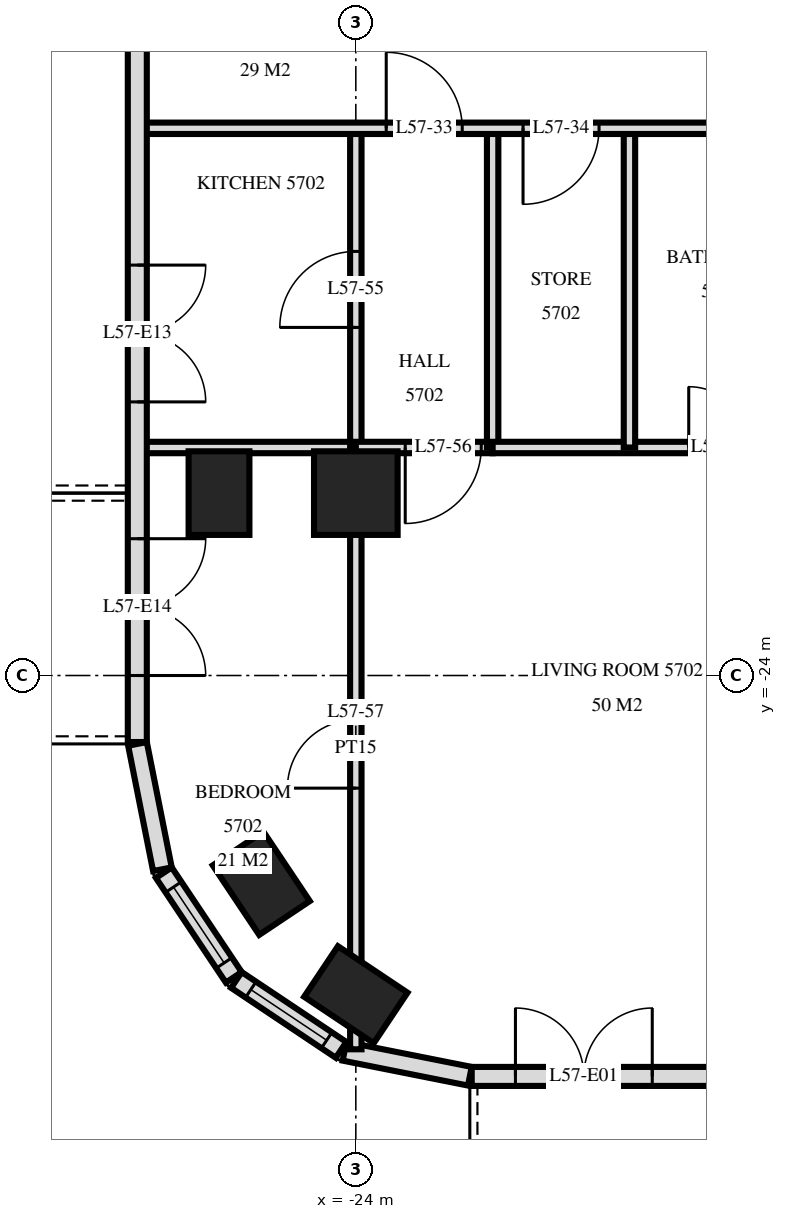
"""IFC4 building model, lengths in metres.
Left out: names, types, materials, properties, quantities, classifications, styles, units other than length and angle.
Written with IfcOpenShell. Run it as: python <this file> out.ifc"""

import sys

from ifc_helpers import new_model, si_unit, direction, frame, frame_2d, origin, origin_2d, place, context, subcontext, project, spatial, rectangle, extrude, element, fill, save


model = new_model("IFC4")
c1 = context("Model", 3, precision=1e-05, world=origin(), true_north=direction((0.0, 1.0)))
c2 = subcontext(c1, "Body", "Model", "MODEL_VIEW")
j1 = project(units=[si_unit("LENGTHUNIT", "METRE"), si_unit("PLANEANGLEUNIT", "RADIAN")], contexts=[c1])
p1 = place(None, origin())
s1 = spatial("IfcSite", under=j1, at=p1, CompositionType="ELEMENT")
p2 = place(p1, origin())
s2 = spatial("IfcBuilding", under=s1, at=p2, CompositionType="ELEMENT")
p3 = place(p2, frame((0.0, 0.0, 218.6)))
s3 = spatial("IfcBuildingStorey", under=s2, at=p3, CompositionType="ELEMENT", Elevation=218.6)
for number, where, z_axis, x_axis in (
    (1, (-25.8, -21.6, 0.0), (0.0, 0.0, 1.0), (0.0, 1.0, 0.0)),
    (2, (-25.244, -26.733, 0.0), (0.0, 0.0, 1.0), (-0.556, 0.831, 0.0)),
    (3, (-24.0, -28.2, 0.0), (0.0, 0.0, 1.0), (-0.831, 0.556, 0.0)),
):
    element("IfcColumn", number, at=place(p3, frame(where, z_axis=z_axis, x_axis=x_axis)), inside=s3, PredefinedType="COLUMN", context=c2, shape_type="SweptSolid", body=[
        extrude(rectangle(XDim=1.1, YDim=0.8, at=origin_2d()), origin(), (0.0, 0.0, 1.0), 3.5),
    ])
p4 = place(p3, frame((-24.0, -21.6, 0.0), z_axis=(0.0, 0.0, 1.0), x_axis=(1.0, 0.0, 0.0)))
e4 = element("IfcColumn", 4, at=p4, inside=s3, PredefinedType="COLUMN", context=c2, shape_type="SweptSolid", body=[
    extrude(rectangle(XDim=1.1, YDim=1.1, at=origin_2d()), origin(), (0.0, 0.0, 1.0), 3.5),
])
p5 = place(p3, frame((-26.875, -3.325, 0.0), z_axis=(0.0, 0.0, 1.0), x_axis=(0.0, -1.0, 0.0)))
e5 = element("IfcWall", 5, at=p5, inside=s3, PredefinedType="SOLIDWALL", context=c2, shape_type="SweptSolid", body=[
    extrude(rectangle(XDim=21.551, YDim=0.25, at=frame_2d((10.775, 0.0))), origin(), (0.0, 0.0, 1.0), 3.22),
])
p6 = place(p5, frame((7.275, 0.0, 0.0)))
e6 = element("IfcOpeningElement", 6, at=p6, cuts=e5, PredefinedType="OPENING", context=c2, shape_type="SweptSolid", body=[
    extrude(rectangle(XDim=1.8, YDim=2.4, at=frame_2d((0.9, 1.2))), frame((0.0, 0.135, 0.0), z_axis=(0.0, -1.0, 0.0), x_axis=(1.0, 0.0, 0.0)), (0.0, 0.0, 1.0), 0.27),
])
p7 = place(p5, frame((15.275, 0.0, 0.0)))
e7 = element("IfcOpeningElement", 7, at=p7, cuts=e5, PredefinedType="OPENING", context=c2, shape_type="SweptSolid", body=[
    extrude(rectangle(XDim=1.8, YDim=2.4, at=frame_2d((0.9, 1.2))), frame((0.0, 0.135, 0.0), z_axis=(0.0, -1.0, 0.0), x_axis=(1.0, 0.0, 0.0)), (0.0, 0.0, 1.0), 0.27),
])
p8 = place(p5, frame((18.875, 0.0, 0.0)))
e8 = element("IfcOpeningElement", 8, at=p8, cuts=e5, PredefinedType="OPENING", context=c2, shape_type="SweptSolid", body=[
    extrude(rectangle(XDim=1.8, YDim=2.4, at=frame_2d((0.9, 1.2))), frame((0.0, 0.135, 0.0), z_axis=(0.0, -1.0, 0.0), x_axis=(1.0, 0.0, 0.0)), (0.0, 0.0, 1.0), 0.27),
])
p9 = place(p3, frame((-26.873, -24.9, 0.0), z_axis=(0.0, 0.0, 1.0), x_axis=(0.195026884138, -0.980797896849, 0.0)))
e9 = element("IfcWall", 9, at=p9, inside=s3, PredefinedType="SOLIDWALL", context=c2, shape_type="SweptSolid", body=[
    extrude(rectangle(XDim=1.681, YDim=0.25, at=frame_2d((0.841, 0.0))), origin(), (0.0, 0.0, 1.0), 3.22),
])
p10 = place(p3, frame((-26.526, -26.594, 0.0), z_axis=(0.0, 0.0, 1.0), x_axis=(0.55555029066, -0.831482937015, 0.0)))
e10 = element("IfcWall", 10, at=p10, inside=s3, PredefinedType="SOLIDWALL", context=c2, shape_type="SweptSolid", body=[
    extrude(rectangle(XDim=1.656, YDim=0.25, at=frame_2d((0.828, 0.0))), origin(), (0.0, 0.0, 1.0), 3.22),
])
p11 = place(p10, frame((0.228, 0.0, 0.9)))
e11 = element("IfcOpeningElement", 11, at=p11, cuts=e10, PredefinedType="OPENING", context=c2, shape_type="SweptSolid", body=[
    extrude(rectangle(XDim=1.2, YDim=1.5, at=frame_2d((0.6, 0.75))), frame((0.0, 0.135, 0.0), z_axis=(0.0, -1.0, 0.0), x_axis=(1.0, 0.0, 0.0)), (0.0, 0.0, 1.0), 0.27),
])
p12 = place(p3, frame((-25.571, -28.006, 0.0), z_axis=(0.0, 0.0, 1.0), x_axis=(0.831482937015, -0.55555029066, 0.0)))
e12 = element("IfcWall", 12, at=p12, inside=s3, PredefinedType="SOLIDWALL", context=c2, shape_type="SweptSolid", body=[
    extrude(rectangle(XDim=1.656, YDim=0.25, at=frame_2d((0.828, 0.0))), origin(), (0.0, 0.0, 1.0), 3.22),
])
p13 = place(p12, frame((0.228, 0.0, 0.9)))
e13 = element("IfcOpeningElement", 13, at=p13, cuts=e12, PredefinedType="OPENING", context=c2, shape_type="SweptSolid", body=[
    extrude(rectangle(XDim=1.2, YDim=1.5, at=frame_2d((0.6, 0.75))), frame((0.0, 0.135, 0.0), z_axis=(0.0, -1.0, 0.0), x_axis=(1.0, 0.0, 0.0)), (0.0, 0.0, 1.0), 0.27),
])
p14 = place(p3, frame((-24.149, -28.945, 0.0), z_axis=(0.0, 0.0, 1.0), x_axis=(0.980775640221, -0.19513878023, 0.0)))
e14 = element("IfcWall", 14, at=p14, inside=s3, PredefinedType="SOLIDWALL", context=c2, shape_type="SweptSolid", body=[
    extrude(rectangle(XDim=1.681, YDim=0.25, at=frame_2d((0.841, 0.0))), origin(), (0.0, 0.0, 1.0), 3.22),
])
p15 = place(p3, frame((-22.475, -29.275, 0.0), z_axis=(0.0, 0.0, 1.0), x_axis=(1.0, 0.0, 0.0)))
e15 = element("IfcWall", 15, at=p15, inside=s3, PredefinedType="SOLIDWALL", context=c2, shape_type="SweptSolid", body=[
    extrude(rectangle(XDim=44.951, YDim=0.25, at=frame_2d((22.475, 0.0))), origin(), (0.0, 0.0, 1.0), 3.22),
])
p16 = place(p15, frame((0.575, 0.0, 0.0)))
e16 = element("IfcOpeningElement", 16, at=p16, cuts=e15, PredefinedType="OPENING", context=c2, shape_type="SweptSolid", body=[
    extrude(rectangle(XDim=1.8, YDim=2.4, at=frame_2d((0.9, 1.2))), frame((0.0, 0.135, 0.0), z_axis=(0.0, -1.0, 0.0), x_axis=(1.0, 0.0, 0.0)), (0.0, 0.0, 1.0), 0.27),
])
p17 = place(p15, frame((4.775, 0.0, 0.9)))
e17 = element("IfcOpeningElement", 17, at=p17, cuts=e15, PredefinedType="OPENING", context=c2, shape_type="SweptSolid", body=[
    extrude(rectangle(XDim=2.4, YDim=1.5, at=frame_2d((1.2, 0.75))), frame((0.0, 0.135, 0.0), z_axis=(0.0, -1.0, 0.0), x_axis=(1.0, 0.0, 0.0)), (0.0, 0.0, 1.0), 0.27),
])
p18 = place(p15, frame((8.075, 0.0, 0.0)))
e18 = element("IfcOpeningElement", 18, at=p18, cuts=e15, PredefinedType="OPENING", context=c2, shape_type="SweptSolid", body=[
    extrude(rectangle(XDim=1.8, YDim=2.4, at=frame_2d((0.9, 1.2))), frame((0.0, 0.135, 0.0), z_axis=(0.0, -1.0, 0.0), x_axis=(1.0, 0.0, 0.0)), (0.0, 0.0, 1.0), 0.27),
])
p19 = place(p15, frame((11.075, 0.0, 0.0)))
e19 = element("IfcOpeningElement", 19, at=p19, cuts=e15, PredefinedType="OPENING", context=c2, shape_type="SweptSolid", body=[
    extrude(rectangle(XDim=1.8, YDim=2.4, at=frame_2d((0.9, 1.2))), frame((0.0, 0.135, 0.0), z_axis=(0.0, -1.0, 0.0), x_axis=(1.0, 0.0, 0.0)), (0.0, 0.0, 1.0), 0.27),
])
p20 = place(p15, frame((13.775, 0.0, 0.9)))
e20 = element("IfcOpeningElement", 20, at=p20, cuts=e15, PredefinedType="OPENING", context=c2, shape_type="SweptSolid", body=[
    extrude(rectangle(XDim=2.4, YDim=1.5, at=frame_2d((1.2, 0.75))), frame((0.0, 0.135, 0.0), z_axis=(0.0, -1.0, 0.0), x_axis=(1.0, 0.0, 0.0)), (0.0, 0.0, 1.0), 0.27),
])
p21 = place(p15, frame((16.775, 0.0, 0.9)))
e21 = element("IfcOpeningElement", 21, at=p21, cuts=e15, PredefinedType="OPENING", context=c2, shape_type="SweptSolid", body=[
    extrude(rectangle(XDim=2.4, YDim=1.5, at=frame_2d((1.2, 0.75))), frame((0.0, 0.135, 0.0), z_axis=(0.0, -1.0, 0.0), x_axis=(1.0, 0.0, 0.0)), (0.0, 0.0, 1.0), 0.27),
])
p22 = place(p15, frame((20.075, 0.0, 0.0)))
e22 = element("IfcOpeningElement", 22, at=p22, cuts=e15, PredefinedType="OPENING", context=c2, shape_type="SweptSolid", body=[
    extrude(rectangle(XDim=1.8, YDim=2.4, at=frame_2d((0.9, 1.2))), frame((0.0, 0.135, 0.0), z_axis=(0.0, -1.0, 0.0), x_axis=(1.0, 0.0, 0.0)), (0.0, 0.0, 1.0), 0.27),
])
p23 = place(p15, frame((23.075, 0.0, 0.0)))
e23 = element("IfcOpeningElement", 23, at=p23, cuts=e15, PredefinedType="OPENING", context=c2, shape_type="SweptSolid", body=[
    extrude(rectangle(XDim=1.8, YDim=2.4, at=frame_2d((0.9, 1.2))), frame((0.0, 0.135, 0.0), z_axis=(0.0, -1.0, 0.0), x_axis=(1.0, 0.0, 0.0)), (0.0, 0.0, 1.0), 0.27),
])
p24 = place(p15, frame((25.775, 0.0, 0.9)))
e24 = element("IfcOpeningElement", 24, at=p24, cuts=e15, PredefinedType="OPENING", context=c2, shape_type="SweptSolid", body=[
    extrude(rectangle(XDim=2.4, YDim=1.5, at=frame_2d((1.2, 0.75))), frame((0.0, 0.135, 0.0), z_axis=(0.0, -1.0, 0.0), x_axis=(1.0, 0.0, 0.0)), (0.0, 0.0, 1.0), 0.27),
])
p25 = place(p15, frame((29.075, 0.0, 0.0)))
e25 = element("IfcOpeningElement", 25, at=p25, cuts=e15, PredefinedType="OPENING", context=c2, shape_type="SweptSolid", body=[
    extrude(rectangle(XDim=1.8, YDim=2.4, at=frame_2d((0.9, 1.2))), frame((0.0, 0.135, 0.0), z_axis=(0.0, -1.0, 0.0), x_axis=(1.0, 0.0, 0.0)), (0.0, 0.0, 1.0), 0.27),
])
p26 = place(p15, frame((31.775, 0.0, 0.9)))
e26 = element("IfcOpeningElement", 26, at=p26, cuts=e15, PredefinedType="OPENING", context=c2, shape_type="SweptSolid", body=[
    extrude(rectangle(XDim=2.4, YDim=1.5, at=frame_2d((1.2, 0.75))), frame((0.0, 0.135, 0.0), z_axis=(0.0, -1.0, 0.0), x_axis=(1.0, 0.0, 0.0)), (0.0, 0.0, 1.0), 0.27),
])
p27 = place(p15, frame((35.075, 0.0, 0.0)))
e27 = element("IfcOpeningElement", 27, at=p27, cuts=e15, PredefinedType="OPENING", context=c2, shape_type="SweptSolid", body=[
    extrude(rectangle(XDim=1.8, YDim=2.4, at=frame_2d((0.9, 1.2))), frame((0.0, 0.135, 0.0), z_axis=(0.0, -1.0, 0.0), x_axis=(1.0, 0.0, 0.0)), (0.0, 0.0, 1.0), 0.27),
])
p28 = place(p15, frame((41.075, 0.0, 0.0)))
e28 = element("IfcOpeningElement", 28, at=p28, cuts=e15, PredefinedType="OPENING", context=c2, shape_type="SweptSolid", body=[
    extrude(rectangle(XDim=1.8, YDim=2.4, at=frame_2d((0.9, 1.2))), frame((0.0, 0.135, 0.0), z_axis=(0.0, -1.0, 0.0), x_axis=(1.0, 0.0, 0.0)), (0.0, 0.0, 1.0), 0.27),
])
for number, where, z_axis, x_axis in (
    (29, (-20.4, -21.0, 0.0), (0.0, 0.0, 1.0), (0.0, 1.0, 0.0)),
    (30, (-22.2, -21.0, 0.0), (0.0, 0.0, 1.0), (0.0, 1.0, 0.0)),
):
    element("IfcWall", number, at=place(p3, frame(where, z_axis=z_axis, x_axis=x_axis)), inside=s3, PredefinedType="PARTITIONING", context=c2, shape_type="SweptSolid", body=[
        extrude(rectangle(XDim=4.2, YDim=0.15, at=frame_2d((2.1, 0.0))), origin(), (0.0, 0.0, 1.0), 3.22),
    ])
p29 = place(p3, frame((-24.0, -21.0, 0.0), z_axis=(0.0, 0.0, 1.0), x_axis=(0.0, 1.0, 0.0)))
e31 = element("IfcWall", 31, at=p29, inside=s3, PredefinedType="PARTITIONING", context=c2, shape_type="SweptSolid", body=[
    extrude(rectangle(XDim=4.2, YDim=0.15, at=frame_2d((2.1, 0.0))), origin(), (0.0, 0.0, 1.0), 3.22),
])
p30 = place(p29, frame((1.58, 0.0, 0.0)))
e32 = element("IfcOpeningElement", 32, at=p30, cuts=e31, PredefinedType="OPENING", context=c2, shape_type="SweptSolid", body=[
    extrude(rectangle(XDim=1.0, YDim=2.1, at=frame_2d((0.5, 1.05))), frame((0.0, 0.085, 0.0), z_axis=(0.0, -1.0, 0.0), x_axis=(1.0, 0.0, 0.0)), (0.0, 0.0, 1.0), 0.17),
])
p31 = place(p3, frame((-24.0, -28.918, 0.0), z_axis=(0.0, 0.0, 1.0), x_axis=(0.0, 1.0, 0.0)))
e33 = element("IfcWall", 33, at=p31, inside=s3, PredefinedType="PARTITIONING", context=c2, shape_type="SweptSolid", body=[
    extrude(rectangle(XDim=7.918, YDim=0.15, at=frame_2d((3.959, 0.0))), origin(), (0.0, 0.0, 1.0), 3.22),
])
p32 = place(p31, frame((3.436, 0.0, 0.0)))
e34 = element("IfcOpeningElement", 34, at=p32, cuts=e33, PredefinedType="OPENING", context=c2, shape_type="SweptSolid", body=[
    extrude(rectangle(XDim=0.9, YDim=2.1, at=frame_2d((0.45, 1.05))), frame((0.0, 0.085, 0.0), z_axis=(0.0, -1.0, 0.0), x_axis=(1.0, 0.0, 0.0)), (0.0, 0.0, 1.0), 0.17),
])
p33 = place(p3, frame((-24.0, -21.0, 0.0), z_axis=(0.0, 0.0, 1.0), x_axis=(1.0, 0.0, 0.0)))
e35 = element("IfcWall", 35, at=p33, inside=s3, PredefinedType="PARTITIONING", context=c2, shape_type="SweptSolid", body=[
    extrude(rectangle(XDim=1.8, YDim=0.15, at=frame_2d((0.9, 0.0))), origin(), (0.0, 0.0, 1.0), 3.22),
])
p34 = place(p33, frame((0.65, 0.0, 0.0)))
e36 = element("IfcOpeningElement", 36, at=p34, cuts=e35, PredefinedType="OPENING", context=c2, shape_type="SweptSolid", body=[
    extrude(rectangle(XDim=1.0, YDim=2.1, at=frame_2d((0.5, 1.05))), frame((0.0, 0.085, 0.0), z_axis=(0.0, -1.0, 0.0), x_axis=(1.0, 0.0, 0.0)), (0.0, 0.0, 1.0), 0.17),
])
p35 = place(p3, frame((-26.82, -21.0, 0.0), z_axis=(0.0, 0.0, 1.0), x_axis=(1.0, 0.0, 0.0)))
e37 = element("IfcWall", 37, at=p35, inside=s3, PredefinedType="PARTITIONING", context=c2, shape_type="SweptSolid", body=[
    extrude(rectangle(XDim=2.82, YDim=0.15, at=frame_2d((1.41, 0.0))), origin(), (0.0, 0.0, 1.0), 3.22),
])
p36 = place(p3, frame((-22.2, -21.0, 0.0), z_axis=(0.0, 0.0, 1.0), x_axis=(1.0, 0.0, 0.0)))
e38 = element("IfcWall", 38, at=p36, inside=s3, PredefinedType="PARTITIONING", context=c2, shape_type="SweptSolid", body=[
    extrude(rectangle(XDim=6.3, YDim=0.15, at=frame_2d((3.15, 0.0))), origin(), (0.0, 0.0, 1.0), 3.22),
])
p37 = place(p36, frame((2.58, 0.0, 0.0)))
e39 = element("IfcOpeningElement", 39, at=p37, cuts=e38, PredefinedType="OPENING", context=c2, shape_type="SweptSolid", body=[
    extrude(rectangle(XDim=0.8, YDim=2.1, at=frame_2d((0.4, 1.05))), frame((0.0, 0.085, 0.0), z_axis=(0.0, -1.0, 0.0), x_axis=(1.0, 0.0, 0.0)), (0.0, 0.0, 1.0), 0.17),
])
p38 = place(p3, frame((-26.82, -16.8, 0.0), z_axis=(0.0, 0.0, 1.0), x_axis=(1.0, 0.0, 0.0)))
e40 = element("IfcWall", 40, at=p38, inside=s3, PredefinedType="PARTITIONING", context=c2, shape_type="SweptSolid", body=[
    extrude(rectangle(XDim=53.64, YDim=0.15, at=frame_2d((26.82, 0.0))), origin(), (0.0, 0.0, 1.0), 3.22),
])
p39 = place(p38, frame((11.17, 0.0, 0.0)))
e41 = element("IfcOpeningElement", 41, at=p39, cuts=e40, PredefinedType="OPENING", context=c2, shape_type="SweptSolid", body=[
    extrude(rectangle(XDim=1.0, YDim=2.1, at=frame_2d((0.5, 1.05))), frame((0.0, 0.085, 0.0), z_axis=(0.0, -1.0, 0.0), x_axis=(1.0, 0.0, 0.0)), (0.0, 0.0, 1.0), 0.17),
])
p40 = place(p38, frame((3.22, 0.0, 0.0)))
e42 = element("IfcOpeningElement", 42, at=p40, cuts=e40, PredefinedType="OPENING", context=c2, shape_type="SweptSolid", body=[
    extrude(rectangle(XDim=1.0, YDim=2.1, at=frame_2d((0.5, 1.05))), frame((0.0, 0.085, 0.0), z_axis=(0.0, -1.0, 0.0), x_axis=(1.0, 0.0, 0.0)), (0.0, 0.0, 1.0), 0.17),
])
p41 = place(p38, frame((5.02, 0.0, 0.0)))
e43 = element("IfcOpeningElement", 43, at=p41, cuts=e40, PredefinedType="OPENING", context=c2, shape_type="SweptSolid", body=[
    extrude(rectangle(XDim=1.0, YDim=2.1, at=frame_2d((0.5, 1.05))), frame((0.0, 0.085, 0.0), z_axis=(0.0, -1.0, 0.0), x_axis=(1.0, 0.0, 0.0)), (0.0, 0.0, 1.0), 0.17),
])
p42 = place(p38, frame((47.72, 0.0, 0.0)))
e44 = element("IfcOpeningElement", 44, at=p42, cuts=e40, PredefinedType="OPENING", context=c2, shape_type="SweptSolid", body=[
    extrude(rectangle(XDim=1.0, YDim=2.1, at=frame_2d((0.5, 1.05))), frame((0.0, 0.085, 0.0), z_axis=(0.0, -1.0, 0.0), x_axis=(1.0, 0.0, 0.0)), (0.0, 0.0, 1.0), 0.17),
])
p43 = place(p38, frame((51.04, 0.0, 0.0)))
e45 = element("IfcOpeningElement", 45, at=p43, cuts=e40, PredefinedType="OPENING", context=c2, shape_type="SweptSolid", body=[
    extrude(rectangle(XDim=1.0, YDim=2.1, at=frame_2d((0.5, 1.05))), frame((0.0, 0.085, 0.0), z_axis=(0.0, -1.0, 0.0), x_axis=(1.0, 0.0, 0.0)), (0.0, 0.0, 1.0), 0.17),
])
p44 = place(p38, frame((17.32, 0.0, 0.0)))
e46 = element("IfcOpeningElement", 46, at=p44, cuts=e40, PredefinedType="OPENING", context=c2, shape_type="SweptSolid", body=[
    extrude(rectangle(XDim=1.0, YDim=2.1, at=frame_2d((0.5, 1.05))), frame((0.0, 0.085, 0.0), z_axis=(0.0, -1.0, 0.0), x_axis=(1.0, 0.0, 0.0)), (0.0, 0.0, 1.0), 0.17),
])
p45 = place(p38, frame((26.32, 0.0, 0.0)))
e47 = element("IfcOpeningElement", 47, at=p45, cuts=e40, PredefinedType="OPENING", context=c2, shape_type="SweptSolid", body=[
    extrude(rectangle(XDim=1.0, YDim=2.1, at=frame_2d((0.5, 1.05))), frame((0.0, 0.085, 0.0), z_axis=(0.0, -1.0, 0.0), x_axis=(1.0, 0.0, 0.0)), (0.0, 0.0, 1.0), 0.17),
])
p46 = place(p38, frame((35.32, 0.0, 0.0)))
e48 = element("IfcOpeningElement", 48, at=p46, cuts=e40, PredefinedType="OPENING", context=c2, shape_type="SweptSolid", body=[
    extrude(rectangle(XDim=1.0, YDim=2.1, at=frame_2d((0.5, 1.05))), frame((0.0, 0.085, 0.0), z_axis=(0.0, -1.0, 0.0), x_axis=(1.0, 0.0, 0.0)), (0.0, 0.0, 1.0), 0.17),
])
p47 = place(p11, origin())
e49 = element("IfcWindow", 49, at=p47, inside=s3, PartitioningType="SINGLE_PANEL", PredefinedType="WINDOW", context=c2, shape_type="SweptSolid", body=[
    extrude(rectangle(XDim=1.2, YDim=1.5, at=frame_2d((0.6, 0.75))), frame((0.0, 0.03, 0.0), z_axis=(0.0, -1.0, 0.0), x_axis=(1.0, 0.0, 0.0)), (0.0, 0.0, 1.0), 0.06),
])
fill(e11, e49)
p48 = place(p13, origin())
e50 = element("IfcWindow", 50, at=p48, inside=s3, PartitioningType="SINGLE_PANEL", PredefinedType="WINDOW", context=c2, shape_type="SweptSolid", body=[
    extrude(rectangle(XDim=1.2, YDim=1.5, at=frame_2d((0.6, 0.75))), frame((0.0, 0.03, 0.0), z_axis=(0.0, -1.0, 0.0), x_axis=(1.0, 0.0, 0.0)), (0.0, 0.0, 1.0), 0.06),
])
fill(e13, e50)
p49 = place(p16, origin())
e51 = element("IfcDoor", 51, at=p49, inside=s3, OperationType="DOUBLE_DOOR_SINGLE_SWING", PredefinedType="DOOR", context=c2, shape_type="SweptSolid", body=[
    extrude(rectangle(XDim=1.8, YDim=2.4, at=frame_2d((0.9, 1.2))), frame((0.0, 0.025, 0.0), z_axis=(0.0, -1.0, 0.0), x_axis=(1.0, 0.0, 0.0)), (0.0, 0.0, 1.0), 0.05),
])
fill(e16, e51)
p50 = place(p7, origin())
e52 = element("IfcDoor", 52, at=p50, inside=s3, OperationType="DOUBLE_DOOR_SINGLE_SWING", PredefinedType="DOOR", context=c2, shape_type="SweptSolid", body=[
    extrude(rectangle(XDim=1.8, YDim=2.4, at=frame_2d((0.9, 1.2))), frame((0.0, 0.025, 0.0), z_axis=(0.0, -1.0, 0.0), x_axis=(1.0, 0.0, 0.0)), (0.0, 0.0, 1.0), 0.05),
])
fill(e7, e52)
p51 = place(p8, origin())
e53 = element("IfcDoor", 53, at=p51, inside=s3, OperationType="DOUBLE_DOOR_SINGLE_SWING", PredefinedType="DOOR", context=c2, shape_type="SweptSolid", body=[
    extrude(rectangle(XDim=1.8, YDim=2.4, at=frame_2d((0.9, 1.2))), frame((0.0, 0.025, 0.0), z_axis=(0.0, -1.0, 0.0), x_axis=(1.0, 0.0, 0.0)), (0.0, 0.0, 1.0), 0.05),
])
fill(e8, e53)
p52 = place(p40, origin())
e54 = element("IfcDoor", 54, at=p52, inside=s3, OperationType="SINGLE_SWING_RIGHT", PredefinedType="DOOR", context=c2, shape_type="SweptSolid", body=[
    extrude(rectangle(XDim=1.0, YDim=2.1, at=frame_2d((0.5, 1.05))), frame((0.0, 0.025, 0.0), z_axis=(0.0, -1.0, 0.0), x_axis=(1.0, 0.0, 0.0)), (0.0, 0.0, 1.0), 0.05),
])
fill(e42, e54)
p53 = place(p41, frame((0.5, 0.0, 0.0), z_axis=(0.0, 0.0, 1.0), x_axis=(-1.0, 0.0, 0.0)))
e55 = element("IfcDoor", 55, at=p53, inside=s3, OperationType="SINGLE_SWING_LEFT", PredefinedType="DOOR", context=c2, shape_type="SweptSolid", body=[
    extrude(rectangle(XDim=1.0, YDim=2.1, at=frame_2d((0.0, 1.05))), frame((0.0, -0.025, 0.0), z_axis=(0.0, 1.0, 0.0), x_axis=(-1.0, 0.0, 0.0)), (0.0, 0.0, 1.0), 0.05),
])
fill(e43, e55)
p54 = place(p37, origin())
e56 = element("IfcDoor", 56, at=p54, inside=s3, OperationType="SINGLE_SWING_RIGHT", PredefinedType="DOOR", context=c2, shape_type="SweptSolid", body=[
    extrude(rectangle(XDim=0.8, YDim=2.1, at=frame_2d((0.4, 1.05))), frame((0.0, 0.025, 0.0), z_axis=(0.0, -1.0, 0.0), x_axis=(1.0, 0.0, 0.0)), (0.0, 0.0, 1.0), 0.05),
])
fill(e39, e56)
p55 = place(p30, origin())
e57 = element("IfcDoor", 57, at=p55, inside=s3, OperationType="SINGLE_SWING_RIGHT", PredefinedType="DOOR", context=c2, shape_type="SweptSolid", body=[
    extrude(rectangle(XDim=1.0, YDim=2.1, at=frame_2d((0.5, 1.05))), frame((0.0, 0.025, 0.0), z_axis=(0.0, -1.0, 0.0), x_axis=(1.0, 0.0, 0.0)), (0.0, 0.0, 1.0), 0.05),
])
fill(e32, e57)
p56 = place(p34, frame((0.5, 0.0, 0.0), z_axis=(0.0, 0.0, 1.0), x_axis=(-1.0, 0.0, 0.0)))
e58 = element("IfcDoor", 58, at=p56, inside=s3, OperationType="SINGLE_SWING_LEFT", PredefinedType="DOOR", context=c2, shape_type="SweptSolid", body=[
    extrude(rectangle(XDim=1.0, YDim=2.1, at=frame_2d((0.0, 1.05))), frame((0.0, -0.025, 0.0), z_axis=(0.0, 1.0, 0.0), x_axis=(-1.0, 0.0, 0.0)), (0.0, 0.0, 1.0), 0.05),
])
fill(e36, e58)
p57 = place(p32, origin())
e59 = element("IfcDoor", 59, at=p57, inside=s3, OperationType="SINGLE_SWING_RIGHT", PredefinedType="DOOR", context=c2, shape_type="SweptSolid", body=[
    extrude(rectangle(XDim=0.9, YDim=2.1, at=frame_2d((0.45, 1.05))), frame((0.0, 0.025, 0.0), z_axis=(0.0, -1.0, 0.0), x_axis=(1.0, 0.0, 0.0)), (0.0, 0.0, 1.0), 0.05),
])
fill(e34, e59)
save(model, sys.argv[1])
